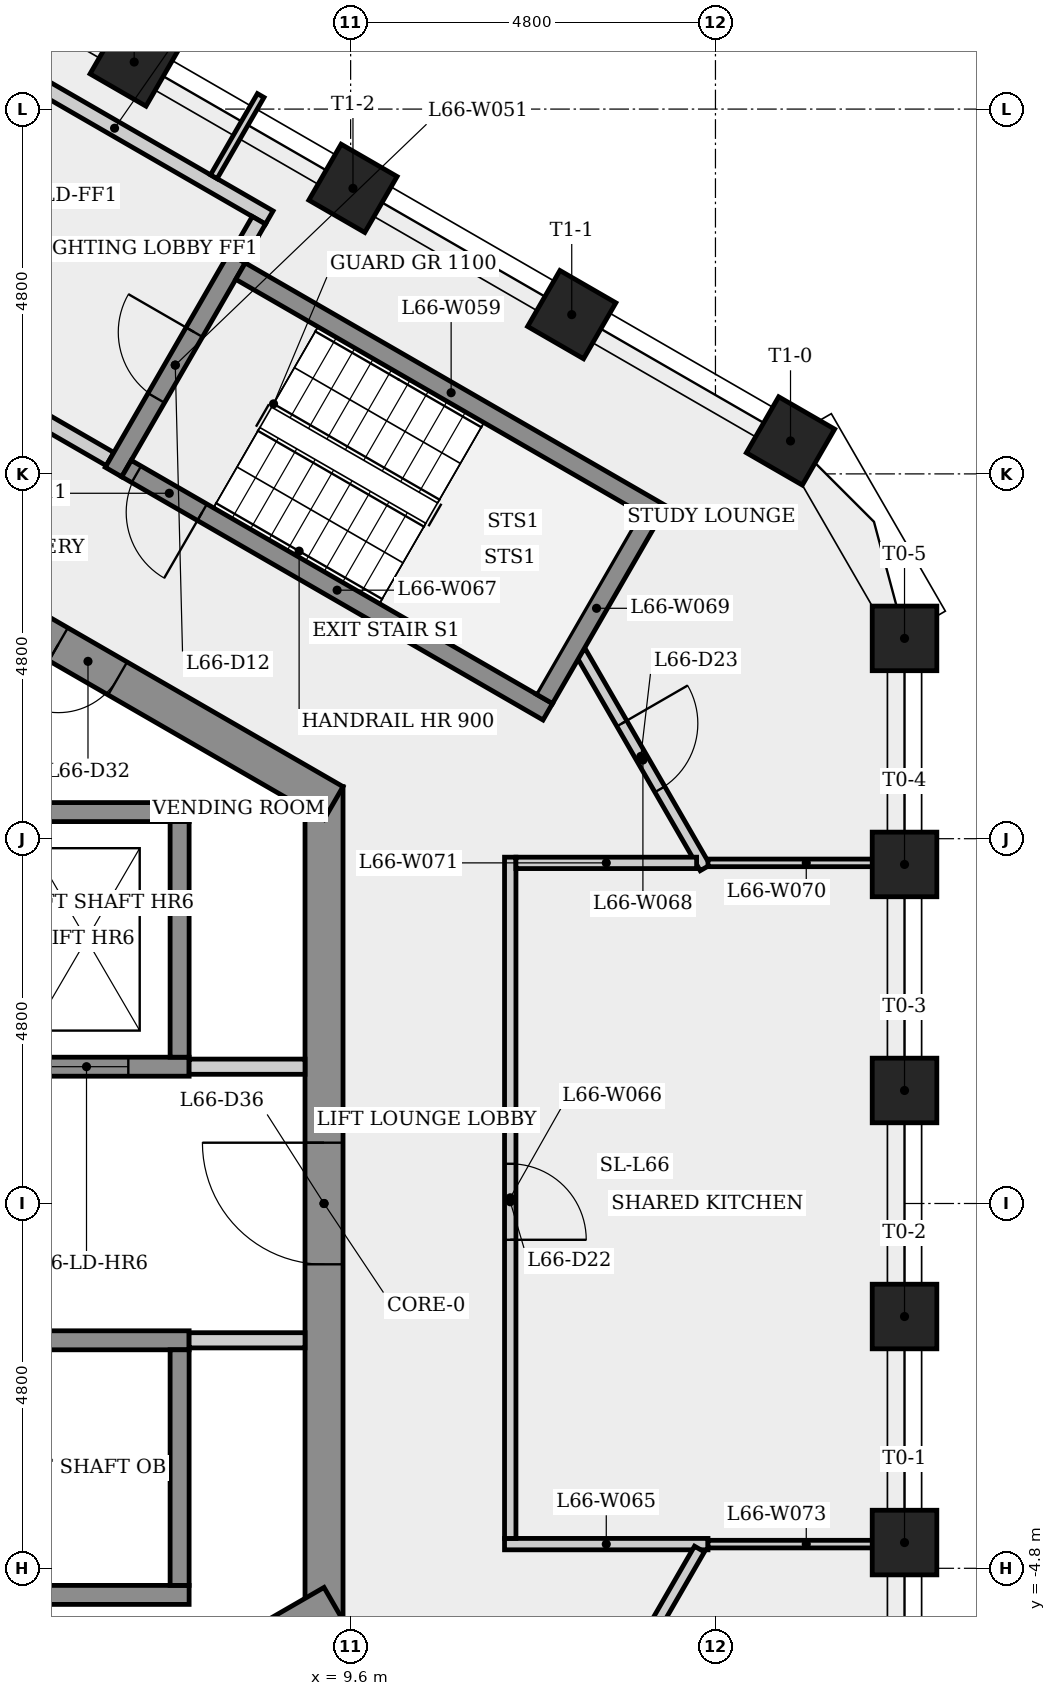
"""IFC4 building model, lengths in metres.
Left out: names, types, materials, properties, quantities, classifications, styles, units other than length and angle.
Written with IfcOpenShell. Run it as: python <this file> out.ifc"""

import sys

from ifc_helpers import new_model, si_unit, direction, frame, frame_2d, origin, origin_2d, place, context, subcontext, project, spatial, rectangle, extrude, element, fill, save


model = new_model("IFC4")
c1 = context("Model", 3, precision=1e-05, world=origin(), true_north=direction((0.0, 1.0)))
c2 = subcontext(c1, "Body", "Model", "MODEL_VIEW")
j1 = project(units=[si_unit("LENGTHUNIT", "METRE"), si_unit("PLANEANGLEUNIT", "RADIAN")], contexts=[c1])
p1 = place(None, origin())
s1 = spatial("IfcSite", under=j1, at=p1, CompositionType="ELEMENT")
p2 = place(p1, origin())
s2 = spatial("IfcBuilding", under=s1, at=p2, CompositionType="ELEMENT")
p3 = place(p2, frame((0.0, 0.0, 246.1)))
s3 = spatial("IfcBuildingStorey", under=s2, at=p3, CompositionType="ELEMENT", Elevation=246.1)
p4 = place(p3, frame((9.25, -5.485, 0.0), z_axis=(0.0, 0.0, 1.0), x_axis=(0.0, 1.0, 0.0)))
e1 = element("IfcWall", 1, at=p4, inside=s3, PredefinedType="SHEAR", context=c2, shape_type="SweptSolid", body=[
    extrude(rectangle(XDim=10.97, YDim=0.5, at=frame_2d((5.485, 0.0))), origin(), (0.0, 0.0, 1.0), 3.4),
])
p5 = place(p4, frame((4.685, 0.0, 0.0)))
e2 = element("IfcOpeningElement", 2, at=p5, cuts=e1, PredefinedType="OPENING", context=c2, shape_type="SweptSolid", body=[
    extrude(rectangle(XDim=1.6, YDim=2.1, at=frame_2d((0.8, 1.05))), frame((0.0, 0.26, 0.0), z_axis=(0.0, -1.0, 0.0), x_axis=(1.0, 0.0, 0.0)), (0.0, 0.0, 1.0), 0.52),
])
p6 = place(p3, frame((9.375, 5.268, 0.0), z_axis=(0.0, 0.0, 1.0), x_axis=(-0.866023993627, 0.500002442456, 0.0)))
e3 = element("IfcWall", 3, at=p6, inside=s3, PredefinedType="SHEAR", context=c2, shape_type="SweptSolid", body=[
    extrude(rectangle(XDim=10.97, YDim=0.5, at=frame_2d((5.485, 0.0))), origin(), (0.0, 0.0, 1.0), 3.4),
])
p7 = place(p6, frame((8.5, 0.0, 0.0)))
e4 = element("IfcOpeningElement", 4, at=p7, cuts=e3, PredefinedType="OPENING", context=c2, shape_type="SweptSolid", body=[
    extrude(rectangle(XDim=0.9, YDim=2.1, at=frame_2d((0.45, 1.05))), frame((0.0, 0.26, 0.0), z_axis=(0.0, -1.0, 0.0), x_axis=(1.0, 0.0, 0.0)), (0.0, 0.0, 1.0), 0.52),
])
p8 = place(p6, frame((3.28, 0.0, 0.0)))
e5 = element("IfcOpeningElement", 5, at=p8, cuts=e3, PredefinedType="OPENING", context=c2, shape_type="SweptSolid", body=[
    extrude(rectangle(XDim=0.9, YDim=2.1, at=frame_2d((0.45, 1.05))), frame((0.0, 0.26, 0.0), z_axis=(0.0, -1.0, 0.0), x_axis=(1.0, 0.0, 0.0)), (0.0, 0.0, 1.0), 0.52),
])
p9 = place(p3, frame((-0.125, -10.753, 0.0), z_axis=(0.0, 0.0, 1.0), x_axis=(0.866023993627, 0.500002442456, 0.0)))
e6 = element("IfcWall", 6, at=p9, inside=s3, PredefinedType="SHEAR", context=c2, shape_type="SweptSolid", body=[
    extrude(rectangle(XDim=10.97, YDim=0.5, at=frame_2d((5.485, 0.0))), origin(), (0.0, 0.0, 1.0), 3.4),
])
p10 = place(p9, frame((7.311, 0.0, 0.0)))
e7 = element("IfcOpeningElement", 7, at=p10, cuts=e6, PredefinedType="OPENING", context=c2, shape_type="SweptSolid", body=[
    extrude(rectangle(XDim=0.9, YDim=2.1, at=frame_2d((0.45, 1.05))), frame((0.0, 0.26, 0.0), z_axis=(0.0, -1.0, 0.0), x_axis=(1.0, 0.0, 0.0)), (0.0, 0.0, 1.0), 0.52),
])
for number, where, z_axis, x_axis in (
    (8, (16.887, -4.461, 0.0), (0.0, 0.0, 1.0), (1.0, 0.0, 0.0)),
    (9, (16.887, -1.487, 0.0), (0.0, 0.0, 1.0), (1.0, 0.0, 0.0)),
    (10, (16.887, 1.487, 0.0), (0.0, 0.0, 1.0), (1.0, 0.0, 0.0)),
    (11, (16.887, 4.461, 0.0), (0.0, 0.0, 1.0), (1.0, 0.0, 0.0)),
    (12, (16.887, 7.436, 0.0), (0.0, 0.0, 1.0), (1.0, 0.0, 0.0)),
    (13, (15.387, 10.033, 0.0), (0.0, 0.0, 1.0), (0.5, 0.866, 0.0)),
    (14, (12.509, 11.695, 0.0), (0.0, 0.0, 1.0), (0.5, 0.866, 0.0)),
    (15, (9.631, 13.357, 0.0), (0.0, 0.0, 1.0), (0.5, 0.866, 0.0)),
    (16, (6.752, 15.019, 0.0), (0.0, 0.0, 1.0), (0.5, 0.866, 0.0)),
):
    element("IfcColumn", number, at=place(p3, frame(where, z_axis=z_axis, x_axis=x_axis)), inside=s3, PredefinedType="COLUMN", context=c2, shape_type="SweptSolid", body=[
        extrude(rectangle(XDim=0.85, YDim=0.85, at=origin_2d()), origin(), (0.0, 0.0, 1.0), 3.4),
    ])
p11 = place(p3, frame((-7.475, 1.8, 0.0), z_axis=(0.0, 0.0, 1.0), x_axis=(1.0, 0.0, 0.0)))
e17 = element("IfcWall", 17, at=p11, inside=s3, PredefinedType="SHEAR", context=c2, shape_type="SweptSolid", body=[
    extrude(rectangle(XDim=14.95, YDim=0.25, at=frame_2d((7.475, 0.0))), origin(), (0.0, 0.0, 1.0), 3.05),
])
p12 = place(p11, frame((0.8, 0.0, 0.0)))
e18 = element("IfcOpeningElement", 18, at=p12, cuts=e17, PredefinedType="OPENING", context=c2, shape_type="SweptSolid", body=[
    extrude(rectangle(XDim=1.1, YDim=2.1, at=frame_2d((0.55, 1.05))), frame((0.0, 0.135, 0.0), z_axis=(0.0, -1.0, 0.0), x_axis=(1.0, 0.0, 0.0)), (0.0, 0.0, 1.0), 0.27),
])
p13 = place(p11, frame((3.25, 0.0, 0.0)))
e19 = element("IfcOpeningElement", 19, at=p13, cuts=e17, PredefinedType="OPENING", context=c2, shape_type="SweptSolid", body=[
    extrude(rectangle(XDim=1.1, YDim=2.1, at=frame_2d((0.55, 1.05))), frame((0.0, 0.135, 0.0), z_axis=(0.0, -1.0, 0.0), x_axis=(1.0, 0.0, 0.0)), (0.0, 0.0, 1.0), 0.27),
])
p14 = place(p11, frame((5.7, 0.0, 0.0)))
e20 = element("IfcOpeningElement", 20, at=p14, cuts=e17, PredefinedType="OPENING", context=c2, shape_type="SweptSolid", body=[
    extrude(rectangle(XDim=1.1, YDim=2.1, at=frame_2d((0.55, 1.05))), frame((0.0, 0.135, 0.0), z_axis=(0.0, -1.0, 0.0), x_axis=(1.0, 0.0, 0.0)), (0.0, 0.0, 1.0), 0.27),
])
p15 = place(p11, frame((8.15, 0.0, 0.0)))
e21 = element("IfcOpeningElement", 21, at=p15, cuts=e17, PredefinedType="OPENING", context=c2, shape_type="SweptSolid", body=[
    extrude(rectangle(XDim=1.1, YDim=2.1, at=frame_2d((0.55, 1.05))), frame((0.0, 0.135, 0.0), z_axis=(0.0, -1.0, 0.0), x_axis=(1.0, 0.0, 0.0)), (0.0, 0.0, 1.0), 0.27),
])
p16 = place(p11, frame((10.6, 0.0, 0.0)))
e22 = element("IfcOpeningElement", 22, at=p16, cuts=e17, PredefinedType="OPENING", context=c2, shape_type="SweptSolid", body=[
    extrude(rectangle(XDim=1.1, YDim=2.1, at=frame_2d((0.55, 1.05))), frame((0.0, 0.135, 0.0), z_axis=(0.0, -1.0, 0.0), x_axis=(1.0, 0.0, 0.0)), (0.0, 0.0, 1.0), 0.27),
])
p17 = place(p11, frame((13.05, 0.0, 0.0)))
e23 = element("IfcOpeningElement", 23, at=p17, cuts=e17, PredefinedType="OPENING", context=c2, shape_type="SweptSolid", body=[
    extrude(rectangle(XDim=1.1, YDim=2.1, at=frame_2d((0.55, 1.05))), frame((0.0, 0.135, 0.0), z_axis=(0.0, -1.0, 0.0), x_axis=(1.0, 0.0, 0.0)), (0.0, 0.0, 1.0), 0.27),
])
p18 = place(p3, frame((-7.225, 5.15, 0.0), z_axis=(0.0, 0.0, 1.0), x_axis=(1.0, 0.0, 0.0)))
e24 = element("IfcWall", 24, at=p18, inside=s3, PredefinedType="SHEAR", context=c2, shape_type="SweptSolid", body=[
    extrude(rectangle(XDim=14.7, YDim=0.25, at=frame_2d((7.35, 0.0))), origin(), (0.0, 0.0, 1.0), 3.05),
])
p19 = place(p3, frame((4.459, 15.323, 0.0), z_axis=(0.0, 0.0, 1.0), x_axis=(0.866016039709, -0.500016218704, 0.0)))
e25 = element("IfcWall", 25, at=p19, inside=s3, PredefinedType="PARTITIONING", context=c2, shape_type="SweptSolid", body=[
    extrude(rectangle(XDim=4.7, YDim=0.2, at=frame_2d((2.35, 0.0))), origin(), (0.0, 0.0, 1.0), 3.05),
])
p20 = place(p3, frame((2.575, -5.15, 0.0), z_axis=(0.0, 0.0, 1.0), x_axis=(1.0, 0.0, 0.0)))
e26 = element("IfcWall", 26, at=p20, inside=s3, PredefinedType="SHEAR", context=c2, shape_type="SweptSolid", body=[
    extrude(rectangle(XDim=4.9, YDim=0.25, at=frame_2d((2.45, 0.0))), origin(), (0.0, 0.0, 1.0), 3.05),
])
p21 = place(p3, frame((2.575, -1.8, 0.0), z_axis=(0.0, 0.0, 1.0), x_axis=(1.0, 0.0, 0.0)))
e27 = element("IfcWall", 27, at=p21, inside=s3, PredefinedType="SHEAR", context=c2, shape_type="SweptSolid", body=[
    extrude(rectangle(XDim=4.9, YDim=0.25, at=frame_2d((2.45, 0.0))), origin(), (0.0, 0.0, 1.0), 3.05),
])
p22 = place(p21, frame((0.597, 0.0, 0.0)))
e28 = element("IfcOpeningElement", 28, at=p22, cuts=e27, PredefinedType="OPENING", context=c2, shape_type="SweptSolid", body=[
    extrude(rectangle(XDim=1.1, YDim=2.1, at=frame_2d((0.55, 1.05))), frame((0.0, 0.135, 0.0), z_axis=(0.0, -1.0, 0.0), x_axis=(1.0, 0.0, 0.0)), (0.0, 0.0, 1.0), 0.27),
])
p23 = place(p3, frame((6.435, 9.795, 0.0), z_axis=(0.0, 0.0, 1.0), x_axis=(-0.866012907634, 0.500021643343, 0.0)))
e29 = element("IfcWall", 29, at=p23, inside=s3, PredefinedType="PARTITIONING", context=c2, shape_type="SweptSolid", body=[
    extrude(rectangle(XDim=4.45, YDim=0.2, at=frame_2d((2.225, 0.0))), origin(), (0.0, 0.0, 1.0), 3.05),
])
p24 = place(p23, frame((1.675, 0.0, 0.0)))
e30 = element("IfcOpeningElement", 30, at=p24, cuts=e29, PredefinedType="OPENING", context=c2, shape_type="SweptSolid", body=[
    extrude(rectangle(XDim=1.1, YDim=2.1, at=frame_2d((0.55, 1.05))), frame((0.0, 0.11, 0.0), z_axis=(0.0, -1.0, 0.0), x_axis=(1.0, 0.0, 0.0)), (0.0, 0.0, 1.0), 0.22),
])
p25 = place(p3, frame((6.48, 9.624, 0.0), z_axis=(0.0, 0.0, 1.0), x_axis=(0.500017246033, 0.866015446554, 0.0)))
e31 = element("IfcWall", 31, at=p25, inside=s3, PredefinedType="SHEAR", context=c2, shape_type="SweptSolid", body=[
    extrude(rectangle(XDim=3.25, YDim=0.25, at=frame_2d((1.625, 0.0))), origin(), (0.0, 0.0, 1.0), 3.05),
])
p26 = place(p25, frame((1.125, 0.0, 0.0)))
e32 = element("IfcOpeningElement", 32, at=p26, cuts=e31, PredefinedType="OPENING", context=c2, shape_type="SweptSolid", body=[
    extrude(rectangle(XDim=1.0, YDim=2.1, at=frame_2d((0.5, 1.05))), frame((0.0, 0.135, 0.0), z_axis=(0.0, -1.0, 0.0), x_axis=(1.0, 0.0, 0.0)), (0.0, 0.0, 1.0), 0.27),
])
p27 = place(p3, frame((7.475, 1.8, 0.0), z_axis=(0.0, 0.0, 1.0), x_axis=(1.0, 0.0, 0.0)))
e33 = element("IfcWall", 33, at=p27, inside=s3, PredefinedType="PARTITIONING", context=c2, shape_type="SweptSolid", body=[
    extrude(rectangle(XDim=1.525, YDim=0.2, at=frame_2d((0.763, 0.0))), origin(), (0.0, 0.0, 1.0), 3.05),
])
for number, where, z_axis, x_axis in (
    (34, (7.35, -1.925, 0.0), (0.0, 0.0, 1.0), (0.0, -1.0, 0.0)),
    (35, (7.35, 5.025, 0.0), (0.0, 0.0, 1.0), (0.0, -1.0, 0.0)),
):
    element("IfcWall", number, at=place(p3, frame(where, z_axis=z_axis, x_axis=x_axis)), inside=s3, PredefinedType="SHEAR", context=c2, shape_type="SweptSolid", body=[
        extrude(rectangle(XDim=3.1, YDim=0.25, at=frame_2d((1.55, 0.0))), origin(), (0.0, 0.0, 1.0), 3.4),
    ])
p28 = place(p3, frame((7.8, 13.51, 0.0), z_axis=(0.0, 0.0, 1.0), x_axis=(0.500076467306, 0.865981250863, 0.0)))
e36 = element("IfcWall", 36, at=p28, inside=s3, PredefinedType="PARTITIONING", context=c2, shape_type="SweptSolid", body=[
    extrude(rectangle(XDim=1.234, YDim=0.1, at=frame_2d((0.617, 0.0))), origin(), (0.0, 0.0, 1.0), 3.05),
])
p29 = place(p3, frame((8.151, 12.268, 0.0), z_axis=(0.0, 0.0, 1.0), x_axis=(0.866025499775, -0.499999833739, 0.0)))
e37 = element("IfcWall", 37, at=p29, inside=s3, PredefinedType="SHEAR", context=c2, shape_type="SweptSolid", body=[
    extrude(rectangle(XDim=6.4, YDim=0.25, at=frame_2d((3.2, 0.0))), origin(), (0.0, 0.0, 1.0), 3.05),
])
p30 = place(p3, frame((8.393, 12.937, 0.0), z_axis=(0.0, 0.0, 1.0), x_axis=(-0.500065409566, -0.86598763626, 0.0)))
e38 = element("IfcWall", 38, at=p30, inside=s3, PredefinedType="PARTITIONING", context=c2, shape_type="SweptSolid", body=[
    extrude(rectangle(XDim=0.575, YDim=0.2, at=frame_2d((0.288, 0.0))), origin(), (0.0, 0.0, 1.0), 3.05),
])
p31 = place(p3, frame((9.0, -1.8, 0.0), z_axis=(0.0, 0.0, 1.0), x_axis=(-1.0, 0.0, 0.0)))
e39 = element("IfcWall", 39, at=p31, inside=s3, PredefinedType="PARTITIONING", context=c2, shape_type="SweptSolid", body=[
    extrude(rectangle(XDim=1.525, YDim=0.2, at=frame_2d((0.763, 0.0))), origin(), (0.0, 0.0, 1.0), 3.05),
])
p32 = place(p3, frame((11.625, -4.482, 0.0), z_axis=(0.0, 0.0, 1.0), x_axis=(1.0, 0.0, 0.0)))
e40 = element("IfcWall", 40, at=p32, inside=s3, PredefinedType="PARTITIONING", context=c2, shape_type="SweptSolid", body=[
    extrude(rectangle(XDim=2.677, YDim=0.15, at=frame_2d((1.338, 0.0))), origin(), (0.0, 0.0, 1.0), 3.05),
])
p33 = place(p3, frame((11.7, 4.557, 0.0), z_axis=(0.0, 0.0, 1.0), x_axis=(0.0, -1.0, 0.0)))
e41 = element("IfcWall", 41, at=p33, inside=s3, PredefinedType="PARTITIONING", context=c2, shape_type="SweptSolid", body=[
    extrude(rectangle(XDim=8.964, YDim=0.15, at=frame_2d((4.482, 0.0))), origin(), (0.0, 0.0, 1.0), 3.05),
])
p34 = place(p33, frame((4.034, 0.0, 0.0)))
e42 = element("IfcOpeningElement", 42, at=p34, cuts=e41, PredefinedType="OPENING", context=c2, shape_type="SweptSolid", body=[
    extrude(rectangle(XDim=1.0, YDim=2.1, at=frame_2d((0.5, 1.05))), frame((0.0, 0.085, 0.0), z_axis=(0.0, -1.0, 0.0), x_axis=(1.0, 0.0, 0.0)), (0.0, 0.0, 1.0), 0.17),
])
p35 = place(p3, frame((12.194, 6.47, 0.0), z_axis=(0.0, 0.0, 1.0), x_axis=(-0.866025499775, 0.499999833739, 0.0)))
e43 = element("IfcWall", 43, at=p35, inside=s3, PredefinedType="SHEAR", context=c2, shape_type="SweptSolid", body=[
    extrude(rectangle(XDim=6.4, YDim=0.25, at=frame_2d((3.2, 0.0))), origin(), (0.0, 0.0, 1.0), 3.05),
])
p36 = place(p35, frame((5.25, 0.0, 0.0)))
e44 = element("IfcOpeningElement", 44, at=p36, cuts=e43, PredefinedType="OPENING", context=c2, shape_type="SweptSolid", body=[
    extrude(rectangle(XDim=1.0, YDim=2.1, at=frame_2d((0.5, 1.05))), frame((0.0, 0.135, 0.0), z_axis=(0.0, -1.0, 0.0), x_axis=(1.0, 0.0, 0.0)), (0.0, 0.0, 1.0), 0.27),
])
p37 = place(p3, frame((12.627, 7.253, 0.0), z_axis=(0.0, 0.0, 1.0), x_axis=(0.500019263395, -0.866014281772, 0.0)))
e45 = element("IfcWall", 45, at=p37, inside=s3, PredefinedType="PARTITIONING", context=c2, shape_type="SweptSolid", body=[
    extrude(rectangle(XDim=3.275, YDim=0.15, at=frame_2d((1.638, 0.0))), origin(), (0.0, 0.0, 1.0), 3.05),
])
p38 = place(p37, frame((1.083, 0.0, 0.0)))
e46 = element("IfcOpeningElement", 46, at=p38, cuts=e45, PredefinedType="OPENING", context=c2, shape_type="SweptSolid", body=[
    extrude(rectangle(XDim=1.0, YDim=2.1, at=frame_2d((0.5, 1.05))), frame((0.0, 0.085, 0.0), z_axis=(0.0, -1.0, 0.0), x_axis=(1.0, 0.0, 0.0)), (0.0, 0.0, 1.0), 0.17),
])
p39 = place(p3, frame((12.148, 6.641, 0.0), z_axis=(0.0, 0.0, 1.0), x_axis=(0.500034990121, 0.866005201286, 0.0)))
e47 = element("IfcWall", 47, at=p39, inside=s3, PredefinedType="SHEAR", context=c2, shape_type="SweptSolid", body=[
    extrude(rectangle(XDim=2.75, YDim=0.25, at=frame_2d((1.375, 0.0))), origin(), (0.0, 0.0, 1.0), 3.05),
])
p40 = place(p3, frame((14.302, 4.482, 0.0), z_axis=(0.0, 0.0, 1.0), x_axis=(1.0, 0.0, 0.0)))
e48 = element("IfcWall", 48, at=p40, inside=s3, PredefinedType="PARTITIONING", context=c2, shape_type="SweptSolid", body=[
    extrude(rectangle(XDim=2.586, YDim=0.1, at=frame_2d((1.293, 0.0))), origin(), (0.0, 0.0, 1.0), 3.05),
])
p41 = place(p3, frame((14.152, 4.482, 0.0), z_axis=(0.0, 0.0, 1.0), x_axis=(-1.0, 0.0, 0.0)))
e49 = element("IfcWall", 49, at=p41, inside=s3, PredefinedType="PARTITIONING", context=c2, shape_type="SweptSolid", body=[
    extrude(rectangle(XDim=2.377, YDim=0.15, at=frame_2d((1.188, 0.0))), origin(), (0.0, 0.0, 1.0), 3.05),
])
p42 = place(p3, frame((14.189, -4.547, 0.0), z_axis=(0.0, 0.0, 1.0), x_axis=(-0.500017457343, -0.866015324548, 0.0)))
e50 = element("IfcWall", 50, at=p42, inside=s3, PredefinedType="PARTITIONING", context=c2, shape_type="SweptSolid", body=[
    extrude(rectangle(XDim=6.615, YDim=0.15, at=frame_2d((3.307, 0.0))), origin(), (0.0, 0.0, 1.0), 3.05),
])
p43 = place(p42, frame((2.807, 0.0, 0.0)))
e51 = element("IfcOpeningElement", 51, at=p43, cuts=e50, PredefinedType="OPENING", context=c2, shape_type="SweptSolid", body=[
    extrude(rectangle(XDim=1.0, YDim=2.1, at=frame_2d((0.5, 1.05))), frame((0.0, 0.085, 0.0), z_axis=(0.0, -1.0, 0.0), x_axis=(1.0, 0.0, 0.0)), (0.0, 0.0, 1.0), 0.17),
])
p44 = place(p3, frame((16.887, -4.482, 0.0), z_axis=(0.0, 0.0, 1.0), x_axis=(-1.0, 0.0, 0.0)))
e52 = element("IfcWall", 52, at=p44, inside=s3, PredefinedType="PARTITIONING", context=c2, shape_type="SweptSolid", body=[
    extrude(rectangle(XDim=2.586, YDim=0.1, at=frame_2d((1.293, 0.0))), origin(), (0.0, 0.0, 1.0), 3.05),
])
p45 = place(p17, origin())
e53 = element("IfcDoor", 53, at=p45, inside=s3, OperationType="SLIDING_TO_LEFT", PredefinedType="DOOR", context=c2, shape_type="SweptSolid", body=[
    extrude(rectangle(XDim=1.1, YDim=2.1, at=frame_2d((0.55, 1.05))), frame((0.0, 0.025, 0.0), z_axis=(0.0, -1.0, 0.0), x_axis=(1.0, 0.0, 0.0)), (0.0, 0.0, 1.0), 0.05),
])
fill(e23, e53)
p46 = place(p36, origin())
e54 = element("IfcDoor", 54, at=p46, inside=s3, OperationType="SINGLE_SWING_LEFT", PredefinedType="DOOR", context=c2, shape_type="SweptSolid", body=[
    extrude(rectangle(XDim=1.0, YDim=2.1, at=frame_2d((0.5, 1.05))), frame((0.0, 0.025, 0.0), z_axis=(0.0, -1.0, 0.0), x_axis=(1.0, 0.0, 0.0)), (0.0, 0.0, 1.0), 0.05),
])
fill(e44, e54)
p47 = place(p26, origin())
e55 = element("IfcDoor", 55, at=p47, inside=s3, OperationType="SINGLE_SWING_RIGHT", PredefinedType="DOOR", context=c2, shape_type="SweptSolid", body=[
    extrude(rectangle(XDim=1.0, YDim=2.1, at=frame_2d((0.5, 1.05))), frame((0.0, 0.025, 0.0), z_axis=(0.0, -1.0, 0.0), x_axis=(1.0, 0.0, 0.0)), (0.0, 0.0, 1.0), 0.05),
])
fill(e32, e55)
p48 = place(p34, origin())
e56 = element("IfcDoor", 56, at=p48, inside=s3, OperationType="SINGLE_SWING_RIGHT", PredefinedType="DOOR", context=c2, shape_type="SweptSolid", body=[
    extrude(rectangle(XDim=1.0, YDim=2.1, at=frame_2d((0.5, 1.05))), frame((0.0, 0.025, 0.0), z_axis=(0.0, -1.0, 0.0), x_axis=(1.0, 0.0, 0.0)), (0.0, 0.0, 1.0), 0.05),
])
fill(e42, e56)
p49 = place(p38, origin())
e57 = element("IfcDoor", 57, at=p49, inside=s3, OperationType="SINGLE_SWING_LEFT", PredefinedType="DOOR", context=c2, shape_type="SweptSolid", body=[
    extrude(rectangle(XDim=1.0, YDim=2.1, at=frame_2d((0.5, 1.05))), frame((0.0, 0.025, 0.0), z_axis=(0.0, -1.0, 0.0), x_axis=(1.0, 0.0, 0.0)), (0.0, 0.0, 1.0), 0.05),
])
fill(e46, e57)
p50 = place(p8, origin())
e58 = element("IfcDoor", 58, at=p50, inside=s3, OperationType="SINGLE_SWING_RIGHT", PredefinedType="DOOR", context=c2, shape_type="SweptSolid", body=[
    extrude(rectangle(XDim=0.9, YDim=2.1, at=frame_2d((0.45, 1.05))), frame((0.0, 0.025, 0.0), z_axis=(0.0, -1.0, 0.0), x_axis=(1.0, 0.0, 0.0)), (0.0, 0.0, 1.0), 0.05),
])
fill(e5, e58)
p51 = place(p5, origin())
e59 = element("IfcDoor", 59, at=p51, inside=s3, OperationType="SINGLE_SWING_RIGHT", PredefinedType="DOOR", context=c2, shape_type="SweptSolid", body=[
    extrude(rectangle(XDim=1.6, YDim=2.1, at=frame_2d((0.8, 1.05))), frame((0.0, 0.025, 0.0), z_axis=(0.0, -1.0, 0.0), x_axis=(1.0, 0.0, 0.0)), (0.0, 0.0, 1.0), 0.05),
])
fill(e2, e59)
save(model, sys.argv[1])
